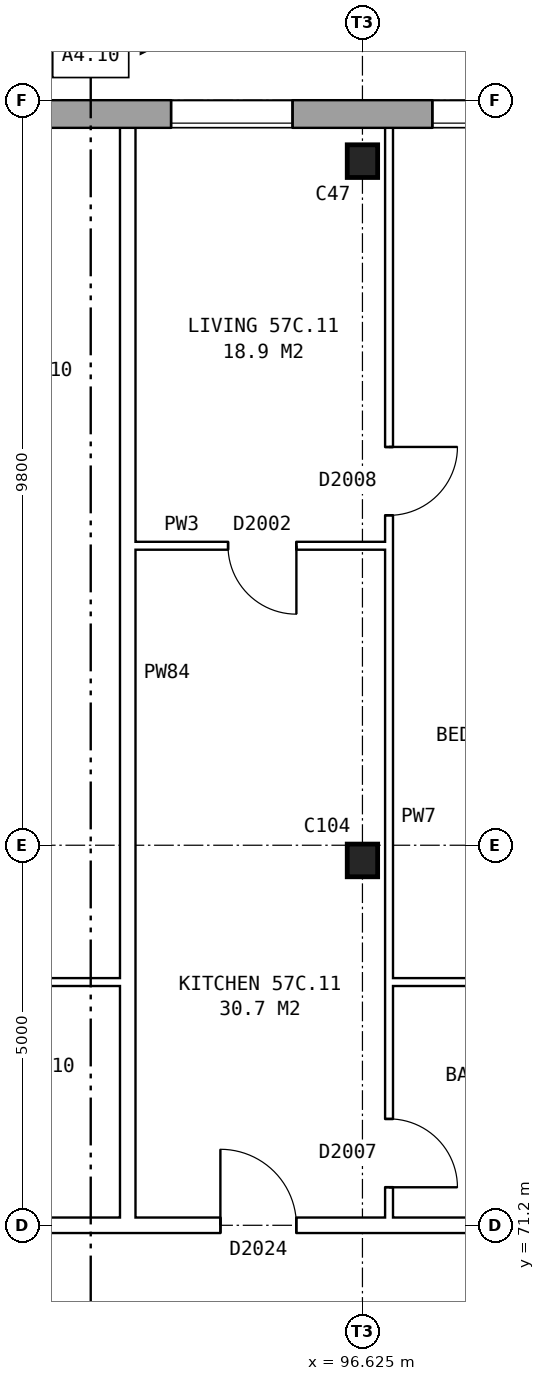
"""IFC4 building model, lengths in metres.
Left out: names, types, materials, properties, quantities, classifications, styles, units other than length and angle.
Written with IfcOpenShell. Run it as: python <this file> out.ifc"""

import sys

from ifc_helpers import new_model, si_unit, direction, frame, frame_2d, origin, origin_2d, place, context, subcontext, project, spatial, rectangle, i_section, extrude, element, fill, save


model = new_model("IFC4")
c1 = context("Model", 3, precision=1e-05, world=origin(), true_north=direction((0.0, 1.0)))
c2 = subcontext(c1, "Body", "Model", "MODEL_VIEW")
j1 = project(units=[si_unit("LENGTHUNIT", "METRE"), si_unit("PLANEANGLEUNIT", "RADIAN")], contexts=[c1])
p1 = place(None, origin())
s1 = spatial("IfcSite", under=j1, at=p1, CompositionType="ELEMENT")
p2 = place(p1, origin())
s2 = spatial("IfcBuilding", under=s1, at=p2, CompositionType="ELEMENT")
p3 = place(p2, frame((0.0, 0.0, 202.8)))
s3 = spatial("IfcBuildingStorey", under=s2, at=p3, CompositionType="ELEMENT", Elevation=202.8)
for number, where, z_axis, x_axis in (
    (1, (96.625, 76.0, 0.0), (0.0, 0.0, 1.0), (1.0, 0.0, 0.0)),
    (2, (96.625, 85.2, 0.0), (0.0, 0.0, 1.0), (1.0, 0.0, 0.0)),
):
    element("IfcColumn", number, at=place(p3, frame(where, z_axis=z_axis, x_axis=x_axis)), inside=s3, PredefinedType="COLUMN", context=c2, shape_type="SweptSolid", body=[
        extrude(i_section(OverallWidth=0.4, OverallDepth=0.43, WebThickness=0.04, FlangeThickness=0.04, at=origin_2d()), origin(), (0.0, 0.0, 1.0), 2.85),
    ])
p4 = place(p3, frame((131.05, 85.82, 0.0), z_axis=(0.0, 0.0, 1.0), x_axis=(-1.0, 0.0, 0.0)))
e3 = element("IfcWall", 3, at=p4, inside=s3, PredefinedType="STANDARD", context=c2, shape_type="SweptSolid", body=[
    extrude(rectangle(XDim=55.1, YDim=0.36, at=frame_2d((27.55, 0.0))), origin(), (0.0, 0.0, 1.0), 2.85),
])
p5 = place(p4, frame((0.969, 0.0, 0.8)))
e4 = element("IfcOpeningElement", 4, at=p5, cuts=e3, PredefinedType="OPENING", context=c2, shape_type="SweptSolid", body=[
    extrude(rectangle(XDim=1.6, YDim=1.8, at=frame_2d((0.8, 0.9))), frame((0.0, 0.19, 0.0), z_axis=(0.0, -1.0, 0.0), x_axis=(1.0, 0.0, 0.0)), (0.0, 0.0, 1.0), 0.38),
])
p6 = place(p4, frame((4.406, 0.0, 0.8)))
e5 = element("IfcOpeningElement", 5, at=p6, cuts=e3, PredefinedType="OPENING", context=c2, shape_type="SweptSolid", body=[
    extrude(rectangle(XDim=1.6, YDim=1.8, at=frame_2d((0.8, 0.9))), frame((0.0, 0.19, 0.0), z_axis=(0.0, -1.0, 0.0), x_axis=(1.0, 0.0, 0.0)), (0.0, 0.0, 1.0), 0.38),
])
p7 = place(p4, frame((7.844, 0.0, 0.8)))
e6 = element("IfcOpeningElement", 6, at=p7, cuts=e3, PredefinedType="OPENING", context=c2, shape_type="SweptSolid", body=[
    extrude(rectangle(XDim=1.6, YDim=1.8, at=frame_2d((0.8, 0.9))), frame((0.0, 0.19, 0.0), z_axis=(0.0, -1.0, 0.0), x_axis=(1.0, 0.0, 0.0)), (0.0, 0.0, 1.0), 0.38),
])
p8 = place(p4, frame((11.281, 0.0, 0.8)))
e7 = element("IfcOpeningElement", 7, at=p8, cuts=e3, PredefinedType="OPENING", context=c2, shape_type="SweptSolid", body=[
    extrude(rectangle(XDim=1.6, YDim=1.8, at=frame_2d((0.8, 0.9))), frame((0.0, 0.19, 0.0), z_axis=(0.0, -1.0, 0.0), x_axis=(1.0, 0.0, 0.0)), (0.0, 0.0, 1.0), 0.38),
])
p9 = place(p4, frame((14.719, 0.0, 0.8)))
e8 = element("IfcOpeningElement", 8, at=p9, cuts=e3, PredefinedType="OPENING", context=c2, shape_type="SweptSolid", body=[
    extrude(rectangle(XDim=1.6, YDim=1.8, at=frame_2d((0.8, 0.9))), frame((0.0, 0.19, 0.0), z_axis=(0.0, -1.0, 0.0), x_axis=(1.0, 0.0, 0.0)), (0.0, 0.0, 1.0), 0.38),
])
p10 = place(p4, frame((18.156, 0.0, 0.8)))
e9 = element("IfcOpeningElement", 9, at=p10, cuts=e3, PredefinedType="OPENING", context=c2, shape_type="SweptSolid", body=[
    extrude(rectangle(XDim=1.6, YDim=1.8, at=frame_2d((0.8, 0.9))), frame((0.0, 0.19, 0.0), z_axis=(0.0, -1.0, 0.0), x_axis=(1.0, 0.0, 0.0)), (0.0, 0.0, 1.0), 0.38),
])
p11 = place(p4, frame((21.594, 0.0, 0.8)))
e10 = element("IfcOpeningElement", 10, at=p11, cuts=e3, PredefinedType="OPENING", context=c2, shape_type="SweptSolid", body=[
    extrude(rectangle(XDim=1.6, YDim=1.8, at=frame_2d((0.8, 0.9))), frame((0.0, 0.19, 0.0), z_axis=(0.0, -1.0, 0.0), x_axis=(1.0, 0.0, 0.0)), (0.0, 0.0, 1.0), 0.38),
])
p12 = place(p4, frame((25.031, 0.0, 0.8)))
e11 = element("IfcOpeningElement", 11, at=p12, cuts=e3, PredefinedType="OPENING", context=c2, shape_type="SweptSolid", body=[
    extrude(rectangle(XDim=1.6, YDim=1.8, at=frame_2d((0.8, 0.9))), frame((0.0, 0.19, 0.0), z_axis=(0.0, -1.0, 0.0), x_axis=(1.0, 0.0, 0.0)), (0.0, 0.0, 1.0), 0.38),
])
p13 = place(p4, frame((28.469, 0.0, 0.8)))
e12 = element("IfcOpeningElement", 12, at=p13, cuts=e3, PredefinedType="OPENING", context=c2, shape_type="SweptSolid", body=[
    extrude(rectangle(XDim=1.6, YDim=1.8, at=frame_2d((0.8, 0.9))), frame((0.0, 0.19, 0.0), z_axis=(0.0, -1.0, 0.0), x_axis=(1.0, 0.0, 0.0)), (0.0, 0.0, 1.0), 0.38),
])
p14 = place(p4, frame((31.906, 0.0, 0.8)))
e13 = element("IfcOpeningElement", 13, at=p14, cuts=e3, PredefinedType="OPENING", context=c2, shape_type="SweptSolid", body=[
    extrude(rectangle(XDim=1.6, YDim=1.8, at=frame_2d((0.8, 0.9))), frame((0.0, 0.19, 0.0), z_axis=(0.0, -1.0, 0.0), x_axis=(1.0, 0.0, 0.0)), (0.0, 0.0, 1.0), 0.38),
])
p15 = place(p4, frame((35.344, 0.0, 0.8)))
e14 = element("IfcOpeningElement", 14, at=p15, cuts=e3, PredefinedType="OPENING", context=c2, shape_type="SweptSolid", body=[
    extrude(rectangle(XDim=1.6, YDim=1.8, at=frame_2d((0.8, 0.9))), frame((0.0, 0.19, 0.0), z_axis=(0.0, -1.0, 0.0), x_axis=(1.0, 0.0, 0.0)), (0.0, 0.0, 1.0), 0.38),
])
p16 = place(p4, frame((38.781, 0.0, 0.8)))
e15 = element("IfcOpeningElement", 15, at=p16, cuts=e3, PredefinedType="OPENING", context=c2, shape_type="SweptSolid", body=[
    extrude(rectangle(XDim=1.6, YDim=1.8, at=frame_2d((0.8, 0.9))), frame((0.0, 0.19, 0.0), z_axis=(0.0, -1.0, 0.0), x_axis=(1.0, 0.0, 0.0)), (0.0, 0.0, 1.0), 0.38),
])
p17 = place(p4, frame((42.219, 0.0, 0.8)))
e16 = element("IfcOpeningElement", 16, at=p17, cuts=e3, PredefinedType="OPENING", context=c2, shape_type="SweptSolid", body=[
    extrude(rectangle(XDim=1.6, YDim=1.8, at=frame_2d((0.8, 0.9))), frame((0.0, 0.19, 0.0), z_axis=(0.0, -1.0, 0.0), x_axis=(1.0, 0.0, 0.0)), (0.0, 0.0, 1.0), 0.38),
])
p18 = place(p4, frame((45.656, 0.0, 0.8)))
e17 = element("IfcOpeningElement", 17, at=p18, cuts=e3, PredefinedType="OPENING", context=c2, shape_type="SweptSolid", body=[
    extrude(rectangle(XDim=1.6, YDim=1.8, at=frame_2d((0.8, 0.9))), frame((0.0, 0.19, 0.0), z_axis=(0.0, -1.0, 0.0), x_axis=(1.0, 0.0, 0.0)), (0.0, 0.0, 1.0), 0.38),
])
p19 = place(p4, frame((49.094, 0.0, 0.8)))
e18 = element("IfcOpeningElement", 18, at=p19, cuts=e3, PredefinedType="OPENING", context=c2, shape_type="SweptSolid", body=[
    extrude(rectangle(XDim=1.6, YDim=1.8, at=frame_2d((0.8, 0.9))), frame((0.0, 0.19, 0.0), z_axis=(0.0, -1.0, 0.0), x_axis=(1.0, 0.0, 0.0)), (0.0, 0.0, 1.0), 0.38),
])
p20 = place(p4, frame((52.531, 0.0, 0.8)))
e19 = element("IfcOpeningElement", 19, at=p20, cuts=e3, PredefinedType="OPENING", context=c2, shape_type="SweptSolid", body=[
    extrude(rectangle(XDim=1.6, YDim=1.8, at=frame_2d((0.8, 0.9))), frame((0.0, 0.19, 0.0), z_axis=(0.0, -1.0, 0.0), x_axis=(1.0, 0.0, 0.0)), (0.0, 0.0, 1.0), 0.38),
])
p21 = place(p3, frame((83.225, 71.2, 0.0), z_axis=(0.0, 0.0, 1.0), x_axis=(1.0, 0.0, 0.0)))
e20 = element("IfcWall", 20, at=p21, inside=s3, PredefinedType="PARTITIONING", context=c2, shape_type="SweptSolid", body=[
    extrude(rectangle(XDim=41.25, YDim=0.2, at=frame_2d((20.625, 0.0))), origin(), (0.0, 0.0, 1.0), 2.85),
])
p22 = place(p21, frame((4.656, 0.0, 0.0)))
e21 = element("IfcOpeningElement", 21, at=p22, cuts=e20, PredefinedType="OPENING", context=c2, shape_type="SweptSolid", body=[
    extrude(rectangle(XDim=1.0, YDim=2.1, at=frame_2d((0.5, 1.05))), frame((0.0, 0.11, 0.0), z_axis=(0.0, -1.0, 0.0), x_axis=(1.0, 0.0, 0.0)), (0.0, 0.0, 1.0), 0.22),
])
p23 = place(p21, frame((11.531, 0.0, 0.0)))
e22 = element("IfcOpeningElement", 22, at=p23, cuts=e20, PredefinedType="OPENING", context=c2, shape_type="SweptSolid", body=[
    extrude(rectangle(XDim=1.0, YDim=2.1, at=frame_2d((0.5, 1.05))), frame((0.0, 0.11, 0.0), z_axis=(0.0, -1.0, 0.0), x_axis=(1.0, 0.0, 0.0)), (0.0, 0.0, 1.0), 0.22),
])
p24 = place(p21, frame((21.844, 0.0, 0.0)))
e23 = element("IfcOpeningElement", 23, at=p24, cuts=e20, PredefinedType="OPENING", context=c2, shape_type="SweptSolid", body=[
    extrude(rectangle(XDim=1.0, YDim=2.1, at=frame_2d((0.5, 1.05))), frame((0.0, 0.11, 0.0), z_axis=(0.0, -1.0, 0.0), x_axis=(1.0, 0.0, 0.0)), (0.0, 0.0, 1.0), 0.22),
])
p25 = place(p21, frame((32.156, 0.0, 0.0)))
e24 = element("IfcOpeningElement", 24, at=p25, cuts=e20, PredefinedType="OPENING", context=c2, shape_type="SweptSolid", body=[
    extrude(rectangle(XDim=1.0, YDim=2.1, at=frame_2d((0.5, 1.05))), frame((0.0, 0.11, 0.0), z_axis=(0.0, -1.0, 0.0), x_axis=(1.0, 0.0, 0.0)), (0.0, 0.0, 1.0), 0.22),
])
p26 = place(p21, frame((35.594, 0.0, 0.0)))
e25 = element("IfcOpeningElement", 25, at=p26, cuts=e20, PredefinedType="OPENING", context=c2, shape_type="SweptSolid", body=[
    extrude(rectangle(XDim=1.0, YDim=2.1, at=frame_2d((0.5, 1.05))), frame((0.0, 0.11, 0.0), z_axis=(0.0, -1.0, 0.0), x_axis=(1.0, 0.0, 0.0)), (0.0, 0.0, 1.0), 0.22),
])
for number, where, z_axis, x_axis in (
    (26, (90.1, 74.4, 0.0), (0.0, 0.0, 1.0), (1.0, 0.0, 0.0)),
    (27, (96.975, 74.4, 0.0), (0.0, 0.0, 1.0), (1.0, 0.0, 0.0)),
):
    element("IfcWall", number, at=place(p3, frame(where, z_axis=z_axis, x_axis=x_axis)), inside=s3, PredefinedType="PARTITIONING", context=c2, shape_type="SweptSolid", body=[
        extrude(rectangle(XDim=3.337, YDim=0.1, at=frame_2d((1.668, 0.0))), origin(), (0.0, 0.0, 1.0), 2.85),
    ])
p27 = place(p3, frame((93.637, 80.14, 0.0), z_axis=(0.0, 0.0, 1.0), x_axis=(1.0, 0.0, 0.0)))
e28 = element("IfcWall", 28, at=p27, inside=s3, PredefinedType="PARTITIONING", context=c2, shape_type="SweptSolid", body=[
    extrude(rectangle(XDim=3.338, YDim=0.1, at=frame_2d((1.669, 0.0))), origin(), (0.0, 0.0, 1.0), 2.85),
])
p28 = place(p27, frame((1.219, 0.0, 0.0)))
e29 = element("IfcOpeningElement", 29, at=p28, cuts=e28, PredefinedType="OPENING", context=c2, shape_type="SweptSolid", body=[
    extrude(rectangle(XDim=0.9, YDim=2.1, at=frame_2d((0.45, 1.05))), frame((0.0, 0.06, 0.0), z_axis=(0.0, -1.0, 0.0), x_axis=(1.0, 0.0, 0.0)), (0.0, 0.0, 1.0), 0.12),
])
p29 = place(p3, frame((93.537, 71.3, 0.0), z_axis=(0.0, 0.0, 1.0), x_axis=(0.0, 1.0, 0.0)))
e30 = element("IfcWall", 30, at=p29, inside=s3, PredefinedType="PARTITIONING", context=c2, shape_type="SweptSolid", body=[
    extrude(rectangle(XDim=14.34, YDim=0.2, at=frame_2d((7.17, 0.0))), origin(), (0.0, 0.0, 1.0), 2.85),
])
p30 = place(p3, frame((96.975, 71.3, 0.0), z_axis=(0.0, 0.0, 1.0), x_axis=(0.0, 1.0, 0.0)))
e31 = element("IfcWall", 31, at=p30, inside=s3, PredefinedType="PARTITIONING", context=c2, shape_type="SweptSolid", body=[
    extrude(rectangle(XDim=14.34, YDim=0.1, at=frame_2d((7.17, 0.0))), origin(), (0.0, 0.0, 1.0), 2.85),
])
p31 = place(p30, frame((9.24, 0.0, 0.0)))
e32 = element("IfcOpeningElement", 32, at=p31, cuts=e31, PredefinedType="OPENING", context=c2, shape_type="SweptSolid", body=[
    extrude(rectangle(XDim=0.9, YDim=2.1, at=frame_2d((0.45, 1.05))), frame((0.0, 0.06, 0.0), z_axis=(0.0, -1.0, 0.0), x_axis=(1.0, 0.0, 0.0)), (0.0, 0.0, 1.0), 0.12),
])
p32 = place(p30, frame((0.4, 0.0, 0.0)))
e33 = element("IfcOpeningElement", 33, at=p32, cuts=e31, PredefinedType="OPENING", context=c2, shape_type="SweptSolid", body=[
    extrude(rectangle(XDim=0.9, YDim=2.1, at=frame_2d((0.45, 1.05))), frame((0.0, 0.06, 0.0), z_axis=(0.0, -1.0, 0.0), x_axis=(1.0, 0.0, 0.0)), (0.0, 0.0, 1.0), 0.12),
])
p33 = place(p14, origin())
e34 = element("IfcWindow", 34, at=p33, inside=s3, PartitioningType="SINGLE_PANEL", PredefinedType="WINDOW", context=c2, shape_type="SweptSolid", body=[
    extrude(rectangle(XDim=1.6, YDim=1.8, at=frame_2d((0.8, 0.9))), frame((0.0, 0.15, 0.0), z_axis=(0.0, -1.0, 0.0), x_axis=(1.0, 0.0, 0.0)), (0.0, 0.0, 1.0), 0.06),
])
fill(e13, e34)
p34 = place(p15, origin())
e35 = element("IfcWindow", 35, at=p34, inside=s3, PartitioningType="SINGLE_PANEL", PredefinedType="WINDOW", context=c2, shape_type="SweptSolid", body=[
    extrude(rectangle(XDim=1.6, YDim=1.8, at=frame_2d((0.8, 0.9))), frame((0.0, 0.15, 0.0), z_axis=(0.0, -1.0, 0.0), x_axis=(1.0, 0.0, 0.0)), (0.0, 0.0, 1.0), 0.06),
])
fill(e14, e35)
p35 = place(p31, frame((0.9, 0.0, 0.0), z_axis=(0.0, 0.0, 1.0), x_axis=(-1.0, 0.0, 0.0)))
e36 = element("IfcDoor", 36, at=p35, inside=s3, OperationType="SINGLE_SWING_LEFT", PredefinedType="DOOR", context=c2, shape_type="SweptSolid", body=[
    extrude(rectangle(XDim=0.9, YDim=2.1, at=frame_2d((0.45, 1.05))), frame((0.0, 0.025, 0.0), z_axis=(0.0, -1.0, 0.0), x_axis=(1.0, 0.0, 0.0)), (0.0, 0.0, 1.0), 0.05),
])
fill(e32, e36)
p36 = place(p23, origin())
e37 = element("IfcDoor", 37, at=p36, inside=s3, OperationType="SINGLE_SWING_LEFT", PredefinedType="DOOR", context=c2, shape_type="SweptSolid", body=[
    extrude(rectangle(XDim=1.0, YDim=2.1, at=frame_2d((0.5, 1.05))), frame((0.0, 0.025, 0.0), z_axis=(0.0, -1.0, 0.0), x_axis=(1.0, 0.0, 0.0)), (0.0, 0.0, 1.0), 0.05),
])
fill(e22, e37)
p37 = place(p28, frame((0.9, 0.0, 0.0), z_axis=(0.0, 0.0, 1.0), x_axis=(-1.0, 0.0, 0.0)))
e38 = element("IfcDoor", 38, at=p37, inside=s3, OperationType="SINGLE_SWING_LEFT", PredefinedType="DOOR", context=c2, shape_type="SweptSolid", body=[
    extrude(rectangle(XDim=0.9, YDim=2.1, at=frame_2d((0.45, 1.05))), frame((0.0, 0.025, 0.0), z_axis=(0.0, -1.0, 0.0), x_axis=(1.0, 0.0, 0.0)), (0.0, 0.0, 1.0), 0.05),
])
fill(e29, e38)
p38 = place(p32, frame((0.9, 0.0, 0.0), z_axis=(0.0, 0.0, 1.0), x_axis=(-1.0, 0.0, 0.0)))
e39 = element("IfcDoor", 39, at=p38, inside=s3, OperationType="SINGLE_SWING_RIGHT", PredefinedType="DOOR", context=c2, shape_type="SweptSolid", body=[
    extrude(rectangle(XDim=0.9, YDim=2.1, at=frame_2d((0.45, 1.05))), frame((0.0, 0.025, 0.0), z_axis=(0.0, -1.0, 0.0), x_axis=(1.0, 0.0, 0.0)), (0.0, 0.0, 1.0), 0.05),
])
fill(e33, e39)
save(model, sys.argv[1])
